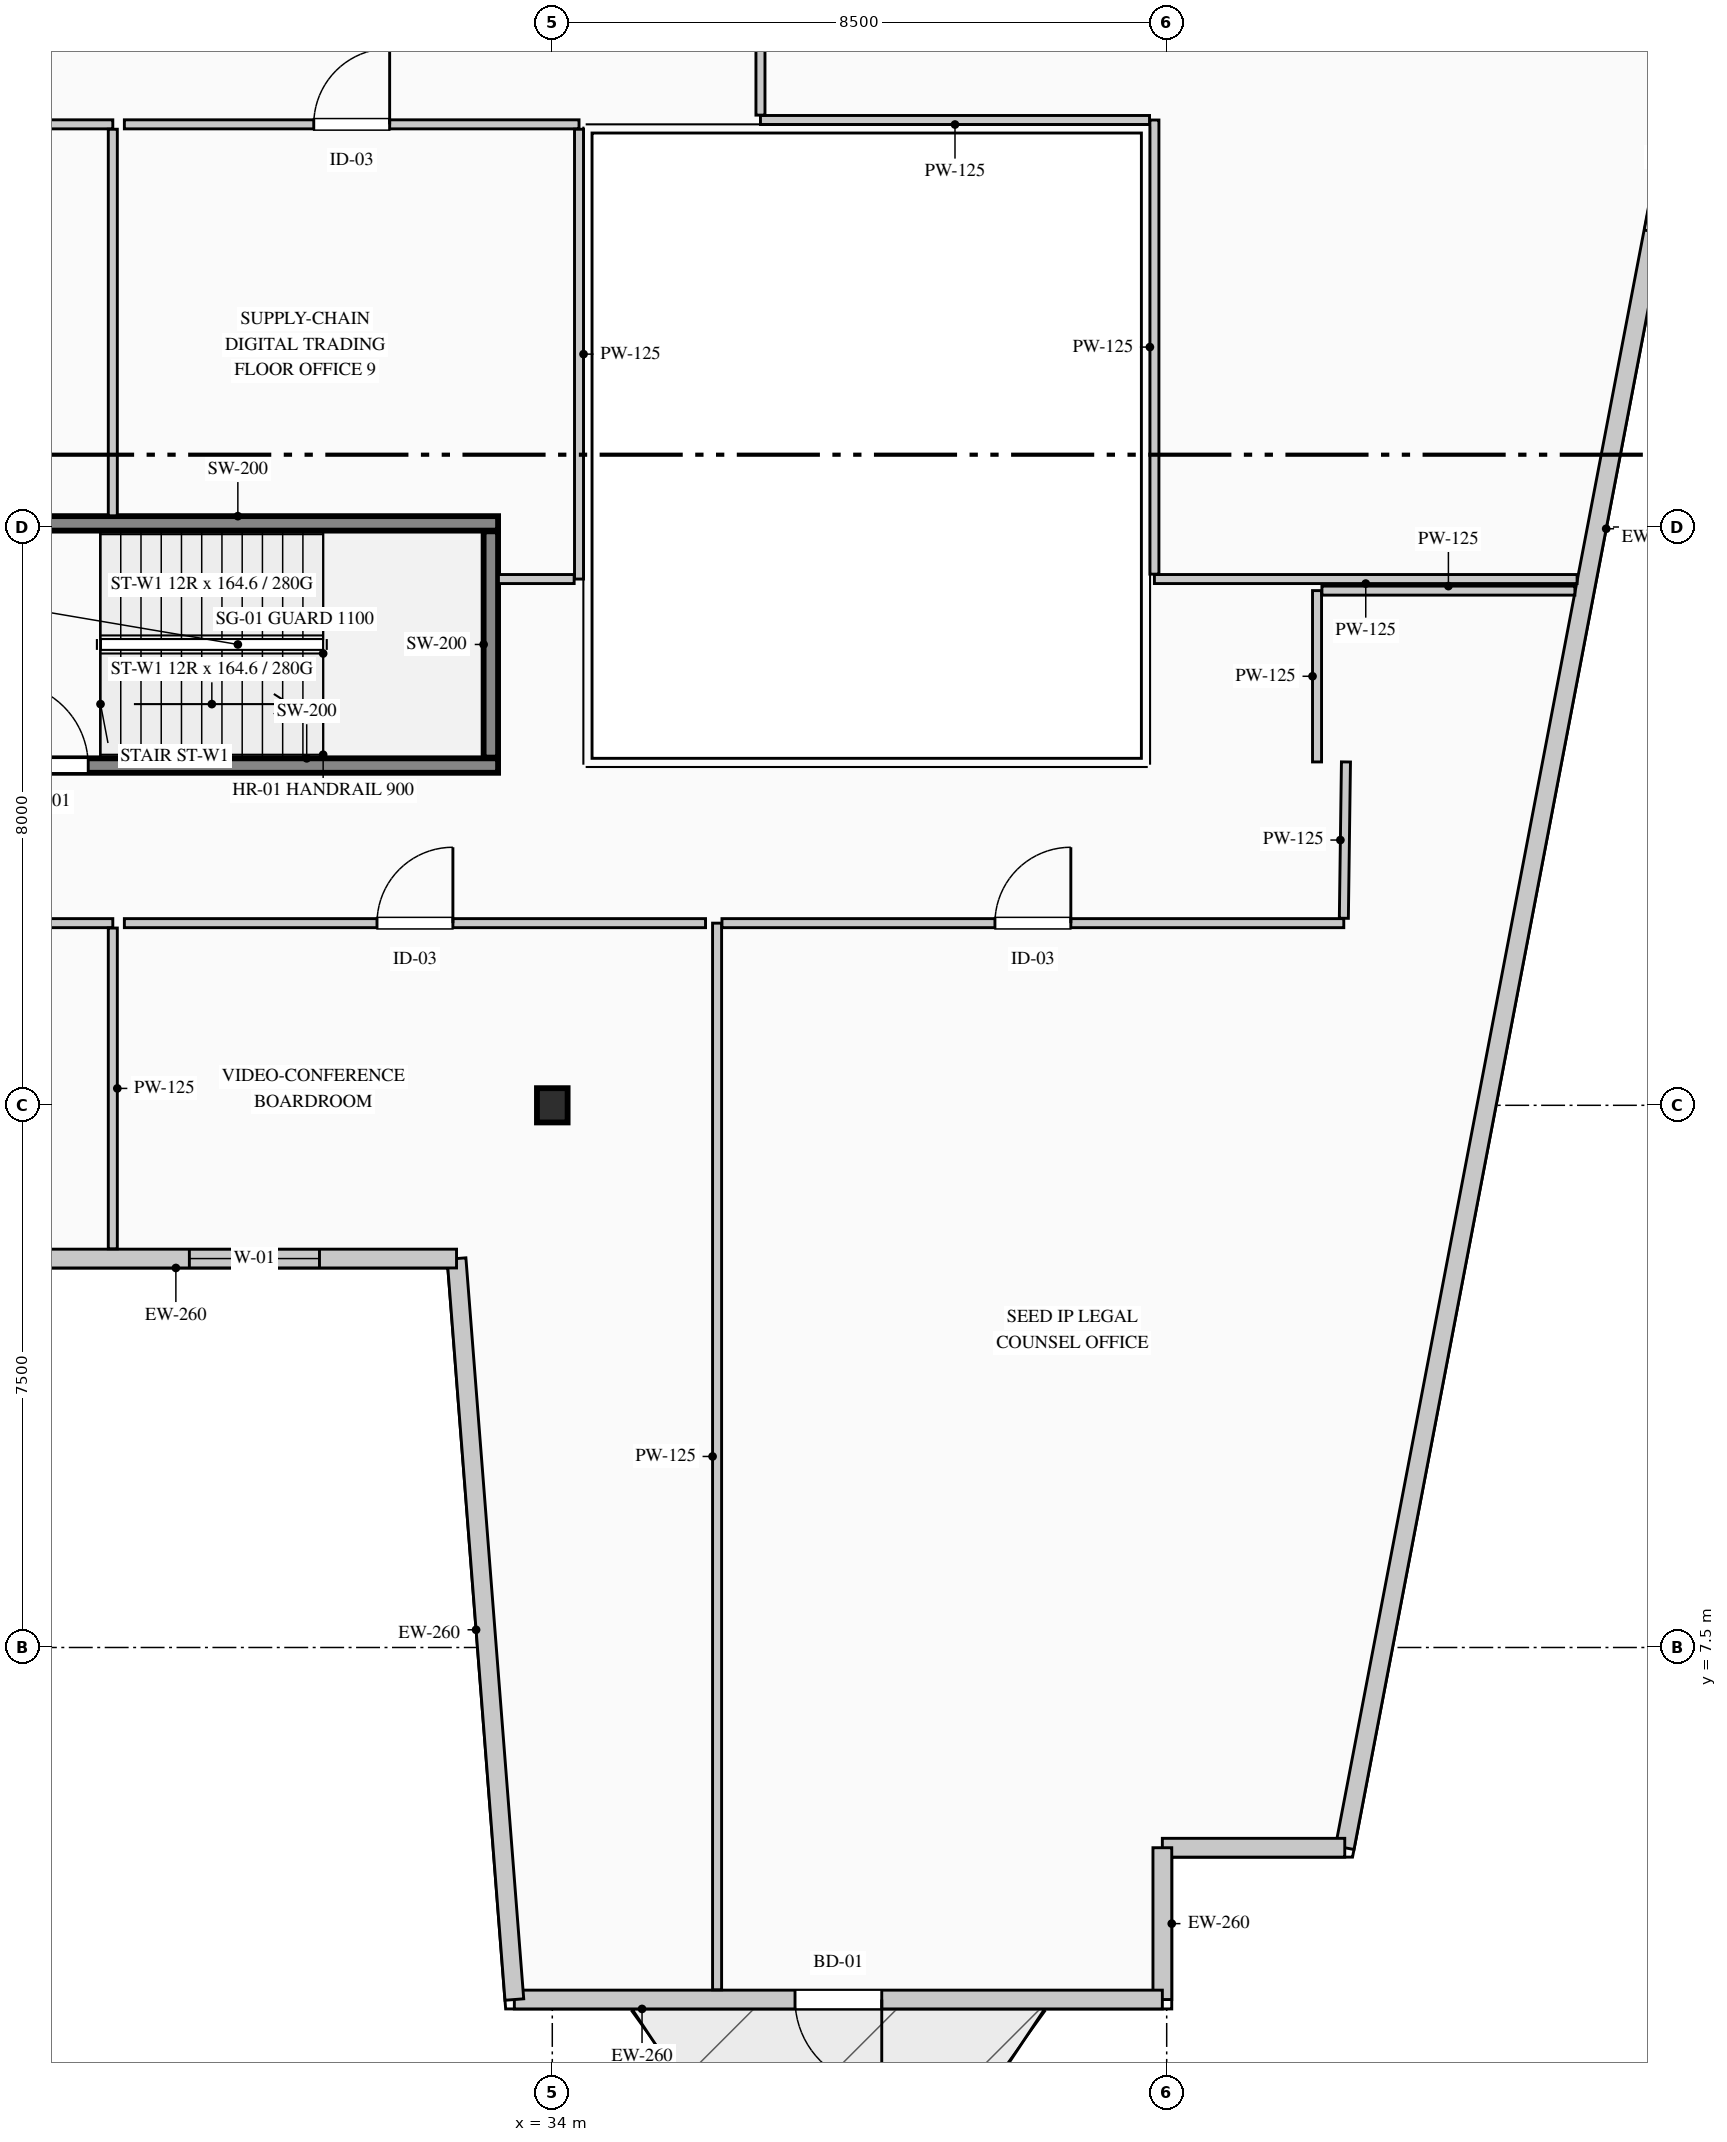
"""IFC4 building model, lengths in metres.
Left out: names, types, materials, properties, quantities, classifications, styles, units other than length and angle.
Written with IfcOpenShell. Run it as: python <this file> out.ifc"""

import sys

from ifc_helpers import new_model, si_unit, direction, frame, frame_2d, origin, origin_2d, place, context, subcontext, project, spatial, rectangle, i_section, extrude, element, fill, save


model = new_model("IFC4")
c1 = context("Model", 3, precision=1e-05, world=origin(), true_north=direction((0.0, 1.0)))
c2 = subcontext(c1, "Body", "Model", "MODEL_VIEW")
j1 = project(units=[si_unit("LENGTHUNIT", "METRE"), si_unit("PLANEANGLEUNIT", "RADIAN")], contexts=[c1])
p1 = place(None, origin())
s1 = spatial("IfcSite", under=j1, at=p1, CompositionType="ELEMENT")
p2 = place(p1, origin())
s2 = spatial("IfcBuilding", under=s1, at=p2, CompositionType="ELEMENT")
p3 = place(p2, frame((0.0, 0.0, 146.95)))
s3 = spatial("IfcBuildingStorey", under=s2, at=p3, CompositionType="ELEMENT", Elevation=146.95)
p4 = place(p3, frame((26.05, 19.7, 0.0), z_axis=(0.0, 0.0, 1.0), x_axis=(1.0, 0.0, 0.0)))
e1 = element("IfcWall", 1, at=p4, inside=s3, PredefinedType="SHEAR", context=c2, shape_type="SweptSolid", body=[
    extrude(rectangle(XDim=7.2, YDim=0.2, at=frame_2d((3.6, 0.0))), origin(), (0.0, 0.0, 1.0), 3.95),
])
p5 = place(p4, frame((0.38, 0.0, 0.0)))
e2 = element("IfcOpeningElement", 2, at=p5, cuts=e1, PredefinedType="OPENING", context=c2, shape_type="SweptSolid", body=[
    extrude(rectangle(XDim=1.15, YDim=2.2, at=frame_2d((0.575, 1.1))), frame((0.0, 0.11, 0.0), z_axis=(0.0, -1.0, 0.0), x_axis=(1.0, 0.0, 0.0)), (0.0, 0.0, 1.0), 0.22),
])
p6 = place(p3, frame((26.05, 23.05, 0.0), z_axis=(0.0, 0.0, 1.0), x_axis=(1.0, 0.0, 0.0)))
e3 = element("IfcWall", 3, at=p6, inside=s3, PredefinedType="SHEAR", context=c2, shape_type="SweptSolid", body=[
    extrude(rectangle(XDim=7.2, YDim=0.2, at=frame_2d((3.6, 0.0))), origin(), (0.0, 0.0, 1.0), 3.95),
])
p7 = place(p3, frame((33.15, 19.81, 0.0), z_axis=(0.0, 0.0, 1.0), x_axis=(0.0, 1.0, 0.0)))
e4 = element("IfcWall", 4, at=p7, inside=s3, PredefinedType="SHEAR", context=c2, shape_type="SweptSolid", body=[
    extrude(rectangle(XDim=3.13, YDim=0.2, at=frame_2d((1.565, 0.0))), origin(), (0.0, 0.0, 1.0), 3.95),
])
p8 = place(p3, frame((34.0, 15.0, 0.0), z_axis=(0.0, 0.0, 1.0), x_axis=(1.0, 0.0, 0.0)))
e5 = element("IfcColumn", 5, at=p8, inside=s3, PredefinedType="COLUMN", context=c2, shape_type="SweptSolid", body=[
    extrude(i_section(OverallWidth=0.424, OverallDepth=0.474, WebThickness=0.048, FlangeThickness=0.077, FilletRadius=0.015, at=origin_2d()), origin(), (0.0, 0.0, 1.0), 3.95),
])
p9 = place(p3, frame((51.942, 41.27, 0.0), z_axis=(0.0, 0.0, 1.0), x_axis=(-0.187592192405, -0.982247000173, 0.0)))
e6 = element("IfcWall", 6, at=p9, inside=s3, PredefinedType="STANDARD", context=c2, shape_type="SweptSolid", body=[
    extrude(rectangle(XDim=37.2, YDim=0.26, at=frame_2d((18.6, 0.0))), origin(), (0.0, 0.0, 1.0), 3.69),
])
p10 = place(p9, frame((12.342, 0.0, 0.9)))
e7 = element("IfcOpeningElement", 7, at=p10, cuts=e6, PredefinedType="OPENING", context=c2, shape_type="SweptSolid", body=[
    extrude(rectangle(XDim=2.1, YDim=2.0, at=frame_2d((1.05, 1.0))), frame((0.0, 0.14, 0.0), z_axis=(0.0, -1.0, 0.0), x_axis=(1.0, 0.0, 0.0)), (0.0, 0.0, 1.0), 0.28),
])
p11 = place(p3, frame((44.963, 4.73, 0.0), z_axis=(0.0, 0.0, 1.0), x_axis=(-1.0, 0.0, 0.0)))
e8 = element("IfcWall", 8, at=p11, inside=s3, PredefinedType="STANDARD", context=c2, shape_type="SweptSolid", body=[
    extrude(rectangle(XDim=2.523, YDim=0.26, at=frame_2d((1.262, 0.0))), origin(), (0.0, 0.0, 1.0), 3.69),
])
p12 = place(p3, frame((42.44, 4.73, 0.0), z_axis=(0.0, 0.0, 1.0), x_axis=(0.0, -1.0, 0.0)))
e9 = element("IfcWall", 9, at=p12, inside=s3, PredefinedType="STANDARD", context=c2, shape_type="SweptSolid", body=[
    extrude(rectangle(XDim=2.1, YDim=0.26, at=frame_2d((1.05, 0.0))), origin(), (0.0, 0.0, 1.0), 3.69),
])
p13 = place(p3, frame((42.44, 2.63, 0.0), z_axis=(0.0, 0.0, 1.0), x_axis=(-1.0, 0.0, 0.0)))
e10 = element("IfcWall", 10, at=p13, inside=s3, PredefinedType="STANDARD", context=c2, shape_type="SweptSolid", body=[
    extrude(rectangle(XDim=8.965, YDim=0.26, at=frame_2d((4.482, 0.0))), origin(), (0.0, 0.0, 1.0), 3.69),
])
p14 = place(p13, frame((3.882, 0.0, 0.0)))
e11 = element("IfcOpeningElement", 11, at=p14, cuts=e10, PredefinedType="OPENING", context=c2, shape_type="SweptSolid", body=[
    extrude(rectangle(XDim=1.2, YDim=2.2, at=frame_2d((0.6, 1.1))), frame((0.0, 0.14, 0.0), z_axis=(0.0, -1.0, 0.0), x_axis=(1.0, 0.0, 0.0)), (0.0, 0.0, 1.0), 0.28),
])
p15 = place(p3, frame((33.475, 2.63, 0.0), z_axis=(0.0, 0.0, 1.0), x_axis=(-0.077793257511, 0.996969512616, 0.0)))
e12 = element("IfcWall", 12, at=p15, inside=s3, PredefinedType="STANDARD", context=c2, shape_type="SweptSolid", body=[
    extrude(rectangle(XDim=10.281, YDim=0.26, at=frame_2d((5.141, 0.0))), origin(), (0.0, 0.0, 1.0), 3.69),
])
p16 = place(p3, frame((32.675, 12.88, 0.0), z_axis=(0.0, 0.0, 1.0), x_axis=(-1.0, 0.0, 0.0)))
e13 = element("IfcWall", 13, at=p16, inside=s3, PredefinedType="STANDARD", context=c2, shape_type="SweptSolid", body=[
    extrude(rectangle(XDim=7.765, YDim=0.26, at=frame_2d((3.883, 0.0))), origin(), (0.0, 0.0, 1.0), 3.69),
])
p17 = place(p16, frame((1.896, 0.0, 0.9)))
e14 = element("IfcOpeningElement", 14, at=p17, cuts=e13, PredefinedType="OPENING", context=c2, shape_type="SweptSolid", body=[
    extrude(rectangle(XDim=1.8, YDim=2.1, at=frame_2d((0.9, 1.05))), frame((0.0, 0.14, 0.0), z_axis=(0.0, -1.0, 0.0), x_axis=(1.0, 0.0, 0.0)), (0.0, 0.0, 1.0), 0.28),
])
p18 = place(p3, frame((19.58, 17.52, 0.0), z_axis=(0.0, 0.0, 1.0), x_axis=(1.0, 0.0, 0.0)))
e15 = element("IfcWall", 15, at=p18, inside=s3, PredefinedType="PARTITIONING", context=c2, shape_type="SweptSolid", body=[
    extrude(rectangle(XDim=8.34, YDim=0.125, at=frame_2d((4.17, 0.0))), origin(), (0.0, 0.0, 1.0), 3.475),
])
p19 = place(p18, frame((3.645, 0.0, 0.0)))
e16 = element("IfcOpeningElement", 16, at=p19, cuts=e15, PredefinedType="OPENING", context=c2, shape_type="SweptSolid", body=[
    extrude(rectangle(XDim=1.05, YDim=2.15, at=frame_2d((0.525, 1.075))), frame((0.0, 0.073, 0.0), z_axis=(0.0, -1.0, 0.0), x_axis=(1.0, 0.0, 0.0)), (0.0, 0.0, 1.0), 0.145),
])
p20 = place(p3, frame((27.92, 17.452, 0.0), z_axis=(0.0, 0.0, 1.0), x_axis=(0.0, -1.0, 0.0)))
e17 = element("IfcWall", 17, at=p20, inside=s3, PredefinedType="PARTITIONING", context=c2, shape_type="SweptSolid", body=[
    extrude(rectangle(XDim=4.438, YDim=0.125, at=frame_2d((2.219, 0.0))), origin(), (0.0, 0.0, 1.0), 3.69),
])
p21 = place(p3, frame((44.58, 19.75, 0.0), z_axis=(0.0, 0.0, 1.0), x_axis=(0.0, 1.0, 0.0)))
e18 = element("IfcWall", 18, at=p21, inside=s3, PredefinedType="PARTITIONING", context=c2, shape_type="SweptSolid", body=[
    extrude(rectangle(XDim=2.37, YDim=0.125, at=frame_2d((1.185, 0.0))), origin(), (0.0, 0.0, 1.0), 3.69),
])
p22 = place(p3, frame((44.647, 22.12, 0.0), z_axis=(0.0, 0.0, 1.0), x_axis=(1.0, 0.0, 0.0)))
e19 = element("IfcWall", 19, at=p22, inside=s3, PredefinedType="PARTITIONING", context=c2, shape_type="SweptSolid", body=[
    extrude(rectangle(XDim=3.5, YDim=0.125, at=frame_2d((1.75, 0.0))), origin(), (0.0, 0.0, 1.0), 3.69),
])
p23 = place(p3, frame((36.28, 2.765, 0.0), z_axis=(0.0, 0.0, 1.0), x_axis=(0.0, 1.0, 0.0)))
e20 = element("IfcWall", 20, at=p23, inside=s3, PredefinedType="PARTITIONING", context=c2, shape_type="SweptSolid", body=[
    extrude(rectangle(XDim=14.755, YDim=0.125, at=frame_2d((7.377, 0.0))), origin(), (0.0, 0.0, 1.0), 3.69),
])
p24 = place(p3, frame((36.347, 17.52, 0.0), z_axis=(0.0, 0.0, 1.0), x_axis=(1.0, 0.0, 0.0)))
e21 = element("IfcWall", 21, at=p24, inside=s3, PredefinedType="PARTITIONING", context=c2, shape_type="SweptSolid", body=[
    extrude(rectangle(XDim=8.603, YDim=0.125, at=frame_2d((4.301, 0.0))), origin(), (0.0, 0.0, 1.0), 3.69),
])
p25 = place(p24, frame((3.776, 0.0, 0.0)))
e22 = element("IfcOpeningElement", 22, at=p25, cuts=e21, PredefinedType="OPENING", context=c2, shape_type="SweptSolid", body=[
    extrude(rectangle(XDim=1.05, YDim=2.15, at=frame_2d((0.525, 1.075))), frame((0.0, 0.073, 0.0), z_axis=(0.0, -1.0, 0.0), x_axis=(1.0, 0.0, 0.0)), (0.0, 0.0, 1.0), 0.145),
])
p26 = place(p3, frame((44.951, 17.587, 0.0), z_axis=(0.0, 0.0, 1.0), x_axis=(0.01343297167, 0.999909773566, 0.0)))
e23 = element("IfcWall", 23, at=p26, inside=s3, PredefinedType="PARTITIONING", context=c2, shape_type="SweptSolid", body=[
    extrude(rectangle(XDim=2.163, YDim=0.125, at=frame_2d((1.082, 0.0))), origin(), (0.0, 0.0, 1.0), 3.69),
])
p27 = place(p3, frame((28.08, 17.52, 0.0), z_axis=(0.0, 0.0, 1.0), x_axis=(1.0, 0.0, 0.0)))
e24 = element("IfcWall", 24, at=p27, inside=s3, PredefinedType="PARTITIONING", context=c2, shape_type="SweptSolid", body=[
    extrude(rectangle(XDim=8.04, YDim=0.125, at=frame_2d((4.02, 0.0))), origin(), (0.0, 0.0, 1.0), 3.475),
])
p28 = place(p27, frame((3.495, 0.0, 0.0)))
e25 = element("IfcOpeningElement", 25, at=p28, cuts=e24, PredefinedType="OPENING", context=c2, shape_type="SweptSolid", body=[
    extrude(rectangle(XDim=1.05, YDim=2.15, at=frame_2d((0.525, 1.075))), frame((0.0, 0.073, 0.0), z_axis=(0.0, -1.0, 0.0), x_axis=(1.0, 0.0, 0.0)), (0.0, 0.0, 1.0), 0.145),
])
p29 = place(p3, frame((22.89, 28.57, 0.0), z_axis=(0.0, 0.0, 1.0), x_axis=(1.0, 0.0, 0.0)))
e26 = element("IfcWall", 26, at=p29, inside=s3, PredefinedType="PARTITIONING", context=c2, shape_type="SweptSolid", body=[
    extrude(rectangle(XDim=5.03, YDim=0.125, at=frame_2d((2.515, 0.0))), origin(), (0.0, 0.0, 1.0), 3.475),
])
p30 = place(p29, frame((1.99, 0.0, 0.0)))
e27 = element("IfcOpeningElement", 27, at=p30, cuts=e26, PredefinedType="OPENING", context=c2, shape_type="SweptSolid", body=[
    extrude(rectangle(XDim=1.05, YDim=2.15, at=frame_2d((0.525, 1.075))), frame((0.0, 0.073, 0.0), z_axis=(0.0, -1.0, 0.0), x_axis=(1.0, 0.0, 0.0)), (0.0, 0.0, 1.0), 0.145),
])
p31 = place(p3, frame((27.92, 28.502, 0.0), z_axis=(0.0, 0.0, 1.0), x_axis=(0.0, -1.0, 0.0)))
e28 = element("IfcWall", 28, at=p31, inside=s3, PredefinedType="PARTITIONING", context=c2, shape_type="SweptSolid", body=[
    extrude(rectangle(XDim=5.347, YDim=0.125, at=frame_2d((2.674, 0.0))), origin(), (0.0, 0.0, 1.0), 3.69),
])
p32 = place(p3, frame((28.08, 28.57, 0.0), z_axis=(0.0, 0.0, 1.0), x_axis=(1.0, 0.0, 0.0)))
e29 = element("IfcWall", 29, at=p32, inside=s3, PredefinedType="PARTITIONING", context=c2, shape_type="SweptSolid", body=[
    extrude(rectangle(XDim=6.29, YDim=0.125, at=frame_2d((3.145, 0.0))), origin(), (0.0, 0.0, 1.0), 3.475),
])
p33 = place(p32, frame((2.62, 0.0, 0.0)))
e30 = element("IfcOpeningElement", 30, at=p33, cuts=e29, PredefinedType="OPENING", context=c2, shape_type="SweptSolid", body=[
    extrude(rectangle(XDim=1.05, YDim=2.15, at=frame_2d((0.525, 1.075))), frame((0.0, 0.073, 0.0), z_axis=(0.0, -1.0, 0.0), x_axis=(1.0, 0.0, 0.0)), (0.0, 0.0, 1.0), 0.145),
])
p34 = place(p3, frame((34.37, 28.502, 0.0), z_axis=(0.0, 0.0, 1.0), x_axis=(0.0, -1.0, 0.0)))
e31 = element("IfcWall", 31, at=p34, inside=s3, PredefinedType="PARTITIONING", context=c2, shape_type="SweptSolid", body=[
    extrude(rectangle(XDim=6.222, YDim=0.125, at=frame_2d((3.111, 0.0))), origin(), (0.0, 0.0, 1.0), 3.69),
])
p35 = place(p3, frame((34.302, 22.28, 0.0), z_axis=(0.0, 0.0, 1.0), x_axis=(-1.0, 0.0, 0.0)))
e32 = element("IfcWall", 32, at=p35, inside=s3, PredefinedType="PARTITIONING", context=c2, shape_type="SweptSolid", body=[
    extrude(rectangle(XDim=1.048, YDim=0.125, at=frame_2d((0.524, 0.0))), origin(), (0.0, 0.0, 1.0), 3.69),
])
p36 = place(p3, frame((48.178, 22.28, 0.0), z_axis=(0.0, 0.0, 1.0), x_axis=(-1.0, 0.0, 0.0)))
e33 = element("IfcWall", 33, at=p36, inside=s3, PredefinedType="PARTITIONING", context=c2, shape_type="SweptSolid", body=[
    extrude(rectangle(XDim=5.848, YDim=0.125, at=frame_2d((2.924, 0.0))), origin(), (0.0, 0.0, 1.0), 3.69),
])
p37 = place(p3, frame((42.33, 22.347, 0.0), z_axis=(0.0, 0.0, 1.0), x_axis=(0.0, 1.0, 0.0)))
e34 = element("IfcWall", 34, at=p37, inside=s3, PredefinedType="PARTITIONING", context=c2, shape_type="SweptSolid", body=[
    extrude(rectangle(XDim=6.282, YDim=0.125, at=frame_2d((3.141, 0.0))), origin(), (0.0, 0.0, 1.0), 3.69),
])
p38 = place(p3, frame((42.262, 28.63, 0.0), z_axis=(0.0, 0.0, 1.0), x_axis=(-1.0, 0.0, 0.0)))
e35 = element("IfcWall", 35, at=p38, inside=s3, PredefinedType="PARTITIONING", context=c2, shape_type="SweptSolid", body=[
    extrude(rectangle(XDim=5.383, YDim=0.125, at=frame_2d((2.691, 0.0))), origin(), (0.0, 0.0, 1.0), 3.69),
])
p39 = place(p3, frame((36.88, 28.698, 0.0), z_axis=(0.0, 0.0, 1.0), x_axis=(0.0, 1.0, 0.0)))
e36 = element("IfcWall", 36, at=p39, inside=s3, PredefinedType="PARTITIONING", context=c2, shape_type="SweptSolid", body=[
    extrude(rectangle(XDim=6.923, YDim=0.125, at=frame_2d((3.461, 0.0))), origin(), (0.0, 0.0, 1.0), 3.69),
])
p40 = place(p39, frame((2.936, 0.0, 0.0)))
e37 = element("IfcOpeningElement", 37, at=p40, cuts=e36, PredefinedType="OPENING", context=c2, shape_type="SweptSolid", body=[
    extrude(rectangle(XDim=1.05, YDim=2.15, at=frame_2d((0.525, 1.075))), frame((0.0, 0.073, 0.0), z_axis=(0.0, -1.0, 0.0), x_axis=(1.0, 0.0, 0.0)), (0.0, 0.0, 1.0), 0.145),
])
p41 = place(p14, origin())
e38 = element("IfcDoor", 38, at=p41, inside=s3, OperationType="SINGLE_SWING_LEFT", PredefinedType="DOOR", context=c2, shape_type="SweptSolid", body=[
    extrude(rectangle(XDim=1.2, YDim=2.2, at=frame_2d((0.6, 1.1))), frame((0.0, 0.025, 0.0), z_axis=(0.0, -1.0, 0.0), x_axis=(1.0, 0.0, 0.0)), (0.0, 0.0, 1.0), 0.05),
])
fill(e11, e38)
p42 = place(p17, origin())
e39 = element("IfcWindow", 39, at=p42, inside=s3, PartitioningType="SINGLE_PANEL", PredefinedType="WINDOW", context=c2, shape_type="SweptSolid", body=[
    extrude(rectangle(XDim=1.8, YDim=2.1, at=frame_2d((0.9, 1.05))), frame((0.0, 0.03, 0.0), z_axis=(0.0, -1.0, 0.0), x_axis=(1.0, 0.0, 0.0)), (0.0, 0.0, 1.0), 0.06),
])
fill(e14, e39)
p43 = place(p5, origin())
e40 = element("IfcDoor", 40, at=p43, inside=s3, OperationType="SINGLE_SWING_LEFT", PredefinedType="DOOR", context=c2, shape_type="SweptSolid", body=[
    extrude(rectangle(XDim=1.15, YDim=2.2, at=frame_2d((0.575, 1.1))), frame((0.0, 0.025, 0.0), z_axis=(0.0, -1.0, 0.0), x_axis=(1.0, 0.0, 0.0)), (0.0, 0.0, 1.0), 0.05),
])
fill(e2, e40)
p44 = place(p25, origin())
e41 = element("IfcDoor", 41, at=p44, inside=s3, OperationType="SINGLE_SWING_RIGHT", PredefinedType="DOOR", context=c2, shape_type="SweptSolid", body=[
    extrude(rectangle(XDim=1.05, YDim=2.15, at=frame_2d((0.525, 1.075))), frame((0.0, 0.025, 0.0), z_axis=(0.0, -1.0, 0.0), x_axis=(1.0, 0.0, 0.0)), (0.0, 0.0, 1.0), 0.05),
])
fill(e22, e41)
p45 = place(p28, origin())
e42 = element("IfcDoor", 42, at=p45, inside=s3, OperationType="SINGLE_SWING_RIGHT", PredefinedType="DOOR", context=c2, shape_type="SweptSolid", body=[
    extrude(rectangle(XDim=1.05, YDim=2.15, at=frame_2d((0.525, 1.075))), frame((0.0, 0.025, 0.0), z_axis=(0.0, -1.0, 0.0), x_axis=(1.0, 0.0, 0.0)), (0.0, 0.0, 1.0), 0.05),
])
fill(e25, e42)
p46 = place(p33, origin())
e43 = element("IfcDoor", 43, at=p46, inside=s3, OperationType="SINGLE_SWING_RIGHT", PredefinedType="DOOR", context=c2, shape_type="SweptSolid", body=[
    extrude(rectangle(XDim=1.05, YDim=2.15, at=frame_2d((0.525, 1.075))), frame((0.0, 0.025, 0.0), z_axis=(0.0, -1.0, 0.0), x_axis=(1.0, 0.0, 0.0)), (0.0, 0.0, 1.0), 0.05),
])
fill(e30, e43)
save(model, sys.argv[1])
